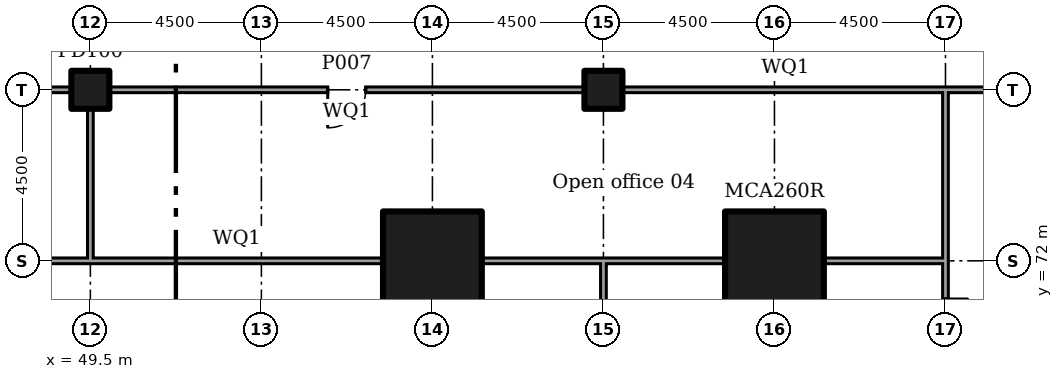
"""IFC4 building model, lengths in metres.
Left out: names, types, materials, properties, quantities, classifications, styles, units other than length and angle.
Written with IfcOpenShell. Run it as: python <this file> out.ifc"""

import sys

from ifc_helpers import new_model, si_unit, direction, frame, frame_2d, origin, origin_2d, place, context, subcontext, project, spatial, rectangle, extrude, element, fill, save


model = new_model("IFC4")
c1 = context("Model", 3, precision=1e-05, world=origin(), true_north=direction((0.0, 1.0)))
c2 = subcontext(c1, "Body", "Model", "MODEL_VIEW")
j1 = project(units=[si_unit("LENGTHUNIT", "METRE"), si_unit("PLANEANGLEUNIT", "RADIAN")], contexts=[c1])
p1 = place(None, origin())
s1 = spatial("IfcSite", under=j1, at=p1, CompositionType="ELEMENT")
p2 = place(p1, origin())
s2 = spatial("IfcBuilding", under=s1, at=p2, CompositionType="ELEMENT")
p3 = place(p2, frame((0.0, 0.0, 11.5)))
s3 = spatial("IfcBuildingStorey", under=s2, at=p3, CompositionType="ELEMENT", Elevation=11.5)
for number, where in (
    (1, (58.5, 72.0, 0.0)),
    (2, (67.5, 72.0, 0.0)),
):
    element("IfcColumn", number, at=place(p3, frame(where)), inside=s3, PredefinedType="COLUMN", context=c2, shape_type="SweptSolid", body=[
        extrude(rectangle(XDim=2.6, YDim=2.6, at=origin_2d()), origin(), (0.0, 0.0, 1.0), 5.0),
    ])
for number, where in (
    (3, (49.5, 76.5, 0.0)),
    (4, (63.0, 76.5, 0.0)),
):
    element("IfcColumn", number, at=place(p3, frame(where)), inside=s3, PredefinedType="COLUMN", context=c2, shape_type="SweptSolid", body=[
        extrude(rectangle(XDim=1.0, YDim=1.0, at=origin_2d()), origin(), (0.0, 0.0, 1.0), 5.0),
    ])
p4 = place(p3, frame((36.495, 76.5, 0.0)))
e5 = element("IfcWall", 5, at=p4, inside=s3, PredefinedType="PARTITIONING", context=c2, shape_type="SweptSolid", body=[
    extrude(rectangle(XDim=12.51, YDim=0.15, at=frame_2d((6.255, 0.0))), origin(), (0.0, 0.0, 1.0), 4.55),
])
p5 = place(p4, frame((5.75, 0.0, 0.0)))
e6 = element("IfcOpeningElement", 6, at=p5, cuts=e5, PredefinedType="OPENING", context=c2, shape_type="SweptSolid", body=[
    extrude(rectangle(XDim=1.0, YDim=2.1, at=frame_2d((0.5, 1.05))), frame((0.0, 0.085, 0.0), z_axis=(0.0, -1.0, 0.0), x_axis=(1.0, 0.0, 0.0)), (0.0, 0.0, 1.0), 0.17),
])
p6 = place(p3, frame((49.995, 76.5, 0.0)))
e7 = element("IfcWall", 7, at=p6, inside=s3, PredefinedType="PARTITIONING", context=c2, shape_type="SweptSolid", body=[
    extrude(rectangle(XDim=12.51, YDim=0.15, at=frame_2d((6.255, 0.0))), origin(), (0.0, 0.0, 1.0), 4.55),
])
p7 = place(p6, frame((5.75, 0.0, 0.0)))
e8 = element("IfcOpeningElement", 8, at=p7, cuts=e7, PredefinedType="OPENING", context=c2, shape_type="SweptSolid", body=[
    extrude(rectangle(XDim=1.0, YDim=2.1, at=frame_2d((0.5, 1.05))), frame((0.0, 0.085, 0.0), z_axis=(0.0, -1.0, 0.0), x_axis=(1.0, 0.0, 0.0)), (0.0, 0.0, 1.0), 0.17),
])
p8 = place(p3, frame((63.495, 76.5, 0.0)))
e9 = element("IfcWall", 9, at=p8, inside=s3, PredefinedType="PARTITIONING", context=c2, shape_type="SweptSolid", body=[
    extrude(rectangle(XDim=8.58, YDim=0.15, at=frame_2d((4.29, 0.0))), origin(), (0.0, 0.0, 1.0), 4.55),
])
p9 = place(p3, frame((72.0, 76.5, 0.0)))
e10 = element("IfcWall", 10, at=p9, inside=s3, PredefinedType="PARTITIONING", context=c2, shape_type="SweptSolid", body=[
    extrude(rectangle(XDim=4.005, YDim=0.15, at=frame_2d((2.002, 0.0))), origin(), (0.0, 0.0, 1.0), 4.55),
])
p10 = place(p9, frame((1.1, 0.0, 0.0)))
e11 = element("IfcOpeningElement", 11, at=p10, cuts=e10, PredefinedType="OPENING", context=c2, shape_type="SweptSolid", body=[
    extrude(rectangle(XDim=1.8, YDim=2.1, at=frame_2d((0.9, 1.05))), frame((0.0, 0.085, 0.0), z_axis=(0.0, -1.0, 0.0), x_axis=(1.0, 0.0, 0.0)), (0.0, 0.0, 1.0), 0.17),
])
p11 = place(p3, frame((49.5, 71.925, 0.0), z_axis=(0.0, 0.0, 1.0), x_axis=(0.0, 1.0, 0.0)))
e12 = element("IfcWall", 12, at=p11, inside=s3, PredefinedType="PARTITIONING", context=c2, shape_type="SweptSolid", body=[
    extrude(rectangle(XDim=4.08, YDim=0.15, at=frame_2d((2.04, 0.0))), origin(), (0.0, 0.0, 1.0), 4.55),
])
p12 = place(p3, frame((46.295, 72.0, 0.0)))
e13 = element("IfcWall", 13, at=p12, inside=s3, PredefinedType="PARTITIONING", context=c2, shape_type="SweptSolid", body=[
    extrude(rectangle(XDim=3.13, YDim=0.15, at=frame_2d((1.565, 0.0))), origin(), (0.0, 0.0, 1.0), 4.55),
])
for number, where in (
    (14, (62.925, 72.0, 0.0)),
    (15, (68.795, 72.0, 0.0)),
):
    element("IfcWall", number, at=place(p3, frame(where)), inside=s3, PredefinedType="PARTITIONING", context=c2, shape_type="SweptSolid", body=[
        extrude(rectangle(XDim=3.28, YDim=0.15, at=frame_2d((1.64, 0.0))), origin(), (0.0, 0.0, 1.0), 4.55),
    ])
p13 = place(p3, frame((49.5, 72.0, 0.0)))
e16 = element("IfcWall", 16, at=p13, inside=s3, PredefinedType="PARTITIONING", context=c2, shape_type="SweptSolid", body=[
    extrude(rectangle(XDim=7.705, YDim=0.15, at=frame_2d((3.853, 0.0))), origin(), (0.0, 0.0, 1.0), 4.55),
])
p14 = place(p3, frame((59.795, 72.0, 0.0)))
e17 = element("IfcWall", 17, at=p14, inside=s3, PredefinedType="PARTITIONING", context=c2, shape_type="SweptSolid", body=[
    extrude(rectangle(XDim=3.205, YDim=0.15, at=frame_2d((1.603, 0.0))), origin(), (0.0, 0.0, 1.0), 4.55),
])
p15 = place(p3, frame((72.0, 72.0, 0.0), z_axis=(0.0, 0.0, 1.0), x_axis=(0.0, 1.0, 0.0)))
e18 = element("IfcWall", 18, at=p15, inside=s3, PredefinedType="PARTITIONING", context=c2, shape_type="SweptSolid", body=[
    extrude(rectangle(XDim=4.425, YDim=0.15, at=frame_2d((2.212, 0.0))), origin(), (0.0, 0.0, 1.0), 4.55),
])
p16 = place(p3, frame((63.0, 62.925, 0.0), z_axis=(0.0, 0.0, 1.0), x_axis=(0.0, 1.0, 0.0)))
e19 = element("IfcWall", 19, at=p16, inside=s3, PredefinedType="PARTITIONING", context=c2, shape_type="SweptSolid", body=[
    extrude(rectangle(XDim=9.0, YDim=0.15, at=frame_2d((4.5, 0.0))), origin(), (0.0, 0.0, 1.0), 4.55),
])
p17 = place(p3, frame((72.0, 68.795, 0.0), z_axis=(0.0, 0.0, 1.0), x_axis=(0.0, 1.0, 0.0)))
e20 = element("IfcWall", 20, at=p17, inside=s3, PredefinedType="PARTITIONING", context=c2, shape_type="SweptSolid", body=[
    extrude(rectangle(XDim=3.13, YDim=0.15, at=frame_2d((1.565, 0.0))), origin(), (0.0, 0.0, 1.0), 4.55),
])
p18 = place(p17, frame((1.0, 0.0, 0.0)))
e21 = element("IfcOpeningElement", 21, at=p18, cuts=e20, PredefinedType="OPENING", context=c2, shape_type="SweptSolid", body=[
    extrude(rectangle(XDim=1.2, YDim=2.1, at=frame_2d((0.6, 1.05))), frame((0.0, 0.085, 0.0), z_axis=(0.0, -1.0, 0.0), x_axis=(1.0, 0.0, 0.0)), (0.0, 0.0, 1.0), 0.17),
])
p19 = place(p7, frame((1.0, 0.0, 0.0), x_axis=(-1.0, 0.0, 0.0)))
e22 = element("IfcDoor", 22, at=p19, inside=s3, OperationType="SINGLE_SWING_LEFT", PredefinedType="DOOR", context=c2, shape_type="SweptSolid", body=[
    extrude(rectangle(XDim=1.0, YDim=2.1, at=frame_2d((0.5, 1.05))), frame((0.0, 0.025, 0.0), z_axis=(0.0, -1.0, 0.0), x_axis=(1.0, 0.0, 0.0)), (0.0, 0.0, 1.0), 0.05),
])
fill(e8, e22)
save(model, sys.argv[1])
